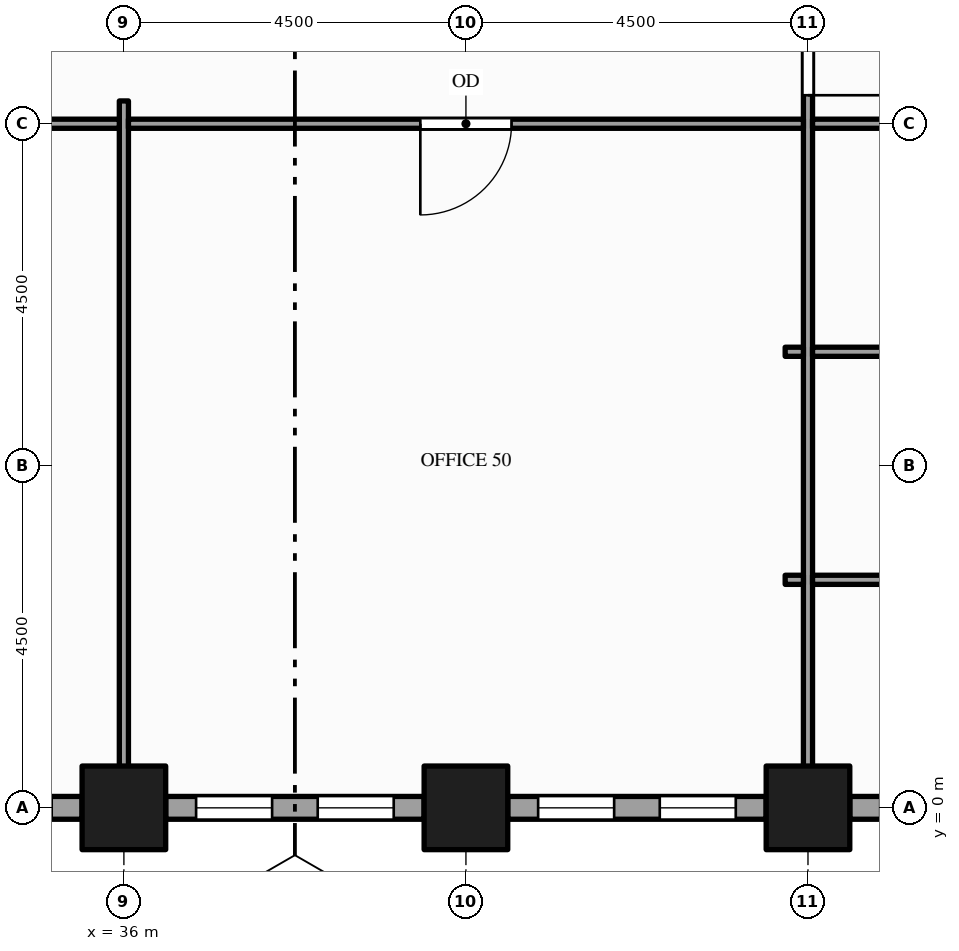
"""IFC4 building model, lengths in metres.
Left out: names, types, materials, properties, quantities, classifications, styles, units other than length and angle.
Written with IfcOpenShell. Run it as: python <this file> out.ifc"""

import sys

from ifc_helpers import new_model, si_unit, direction, frame, frame_2d, origin, origin_2d, place, context, subcontext, project, spatial, rectangle, hollow_rectangle, extrude, element, fill, save


model = new_model("IFC4")
c1 = context("Model", 3, precision=1e-05, world=origin(), true_north=direction((0.0, 1.0)))
c2 = subcontext(c1, "Body", "Model", "MODEL_VIEW")
j1 = project(units=[si_unit("LENGTHUNIT", "METRE"), si_unit("PLANEANGLEUNIT", "RADIAN")], contexts=[c1])
p1 = place(None, origin())
s1 = spatial("IfcSite", under=j1, at=p1, CompositionType="ELEMENT")
p2 = place(p1, origin())
s2 = spatial("IfcBuilding", under=s1, at=p2, CompositionType="ELEMENT")
p3 = place(p2, frame((0.0, 0.0, 19.0)))
s3 = spatial("IfcBuildingStorey", under=s2, at=p3, CompositionType="ELEMENT", Elevation=19.0)
for number, where, z_axis, x_axis in (
    (1, (36.0, 0.0, -0.25), (0.0, 0.0, 1.0), (1.0, 0.0, 0.0)),
    (2, (40.5, 0.0, -0.25), (0.0, 0.0, 1.0), (1.0, 0.0, 0.0)),
    (3, (45.0, 0.0, -0.25), (0.0, 0.0, 1.0), (1.0, 0.0, 0.0)),
):
    element("IfcColumn", number, at=place(p3, frame(where, z_axis=z_axis, x_axis=x_axis)), inside=s3, PredefinedType="COLUMN", context=c2, shape_type="SweptSolid", body=[
        extrude(hollow_rectangle(XDim=1.1, YDim=1.1, WallThickness=0.06, at=origin_2d()), origin(), (0.0, 0.0, 1.0), 5.0),
    ])
p4 = place(p3, frame((32.05, 0.0, 0.0), z_axis=(0.0, 0.0, 1.0), x_axis=(1.0, 0.0, 0.0)))
e4 = element("IfcWall", 4, at=p4, inside=s3, PredefinedType="STANDARD", context=c2, shape_type="SweptSolid", body=[
    extrude(rectangle(XDim=3.4, YDim=0.3, at=frame_2d((1.7, 0.0))), origin(), (0.0, 0.0, 1.0), 4.036),
])
p5 = place(p4, frame((0.4, 0.0, 0.9)))
e5 = element("IfcOpeningElement", 5, at=p5, cuts=e4, PredefinedType="OPENING", context=c2, shape_type="SweptSolid", body=[
    extrude(rectangle(XDim=1.0, YDim=2.75, at=frame_2d((0.5, 1.375))), frame((0.0, 0.16, 0.0), z_axis=(0.0, -1.0, 0.0), x_axis=(1.0, 0.0, 0.0)), (0.0, 0.0, 1.0), 0.32),
])
p6 = place(p4, frame((2.0, 0.0, 0.9)))
e6 = element("IfcOpeningElement", 6, at=p6, cuts=e4, PredefinedType="OPENING", context=c2, shape_type="SweptSolid", body=[
    extrude(rectangle(XDim=1.0, YDim=2.75, at=frame_2d((0.5, 1.375))), frame((0.0, 0.16, 0.0), z_axis=(0.0, -1.0, 0.0), x_axis=(1.0, 0.0, 0.0)), (0.0, 0.0, 1.0), 0.32),
])
p7 = place(p3, frame((36.55, 0.0, 0.0), z_axis=(0.0, 0.0, 1.0), x_axis=(1.0, 0.0, 0.0)))
e7 = element("IfcWall", 7, at=p7, inside=s3, PredefinedType="STANDARD", context=c2, shape_type="SweptSolid", body=[
    extrude(rectangle(XDim=3.4, YDim=0.3, at=frame_2d((1.7, 0.0))), origin(), (0.0, 0.0, 1.0), 4.036),
])
p8 = place(p7, frame((0.4, 0.0, 0.9)))
e8 = element("IfcOpeningElement", 8, at=p8, cuts=e7, PredefinedType="OPENING", context=c2, shape_type="SweptSolid", body=[
    extrude(rectangle(XDim=1.0, YDim=2.75, at=frame_2d((0.5, 1.375))), frame((0.0, 0.16, 0.0), z_axis=(0.0, -1.0, 0.0), x_axis=(1.0, 0.0, 0.0)), (0.0, 0.0, 1.0), 0.32),
])
p9 = place(p7, frame((2.0, 0.0, 0.9)))
e9 = element("IfcOpeningElement", 9, at=p9, cuts=e7, PredefinedType="OPENING", context=c2, shape_type="SweptSolid", body=[
    extrude(rectangle(XDim=1.0, YDim=2.75, at=frame_2d((0.5, 1.375))), frame((0.0, 0.16, 0.0), z_axis=(0.0, -1.0, 0.0), x_axis=(1.0, 0.0, 0.0)), (0.0, 0.0, 1.0), 0.32),
])
p10 = place(p3, frame((41.05, 0.0, 0.0), z_axis=(0.0, 0.0, 1.0), x_axis=(1.0, 0.0, 0.0)))
e10 = element("IfcWall", 10, at=p10, inside=s3, PredefinedType="STANDARD", context=c2, shape_type="SweptSolid", body=[
    extrude(rectangle(XDim=3.4, YDim=0.3, at=frame_2d((1.7, 0.0))), origin(), (0.0, 0.0, 1.0), 4.036),
])
p11 = place(p10, frame((0.4, 0.0, 0.9)))
e11 = element("IfcOpeningElement", 11, at=p11, cuts=e10, PredefinedType="OPENING", context=c2, shape_type="SweptSolid", body=[
    extrude(rectangle(XDim=1.0, YDim=2.75, at=frame_2d((0.5, 1.375))), frame((0.0, 0.16, 0.0), z_axis=(0.0, -1.0, 0.0), x_axis=(1.0, 0.0, 0.0)), (0.0, 0.0, 1.0), 0.32),
])
p12 = place(p10, frame((2.0, 0.0, 0.9)))
e12 = element("IfcOpeningElement", 12, at=p12, cuts=e10, PredefinedType="OPENING", context=c2, shape_type="SweptSolid", body=[
    extrude(rectangle(XDim=1.0, YDim=2.75, at=frame_2d((0.5, 1.375))), frame((0.0, 0.16, 0.0), z_axis=(0.0, -1.0, 0.0), x_axis=(1.0, 0.0, 0.0)), (0.0, 0.0, 1.0), 0.32),
])
p13 = place(p3, frame((45.55, 0.0, 0.0), z_axis=(0.0, 0.0, 1.0), x_axis=(1.0, 0.0, 0.0)))
e13 = element("IfcWall", 13, at=p13, inside=s3, PredefinedType="STANDARD", context=c2, shape_type="SweptSolid", body=[
    extrude(rectangle(XDim=3.4, YDim=0.3, at=frame_2d((1.7, 0.0))), origin(), (0.0, 0.0, 1.0), 4.036),
])
p14 = place(p13, frame((0.4, 0.0, 0.9)))
e14 = element("IfcOpeningElement", 14, at=p14, cuts=e13, PredefinedType="OPENING", context=c2, shape_type="SweptSolid", body=[
    extrude(rectangle(XDim=1.0, YDim=2.75, at=frame_2d((0.5, 1.375))), frame((0.0, 0.16, 0.0), z_axis=(0.0, -1.0, 0.0), x_axis=(1.0, 0.0, 0.0)), (0.0, 0.0, 1.0), 0.32),
])
p15 = place(p13, frame((2.0, 0.0, 0.9)))
e15 = element("IfcOpeningElement", 15, at=p15, cuts=e13, PredefinedType="OPENING", context=c2, shape_type="SweptSolid", body=[
    extrude(rectangle(XDim=1.0, YDim=2.75, at=frame_2d((0.5, 1.375))), frame((0.0, 0.16, 0.0), z_axis=(0.0, -1.0, 0.0), x_axis=(1.0, 0.0, 0.0)), (0.0, 0.0, 1.0), 0.32),
])
p16 = place(p3, frame((36.0, 0.15, 0.0), z_axis=(0.0, 0.0, 1.0), x_axis=(0.0, 1.0, 0.0)))
e16 = element("IfcWall", 16, at=p16, inside=s3, PredefinedType="PARTITIONING", context=c2, shape_type="SweptSolid", body=[
    extrude(rectangle(XDim=9.15, YDim=0.12, at=frame_2d((4.575, 0.0))), origin(), (0.0, 0.0, 1.0), 3.759),
])
p17 = place(p3, frame((45.0, 0.15, 0.0), z_axis=(0.0, 0.0, 1.0), x_axis=(0.0, 1.0, 0.0)))
e17 = element("IfcWall", 17, at=p17, inside=s3, PredefinedType="PARTITIONING", context=c2, shape_type="SweptSolid", body=[
    extrude(rectangle(XDim=22.65, YDim=0.12, at=frame_2d((11.325, 0.0))), origin(), (0.0, 0.0, 1.0), 3.759),
])
p18 = place(p17, frame((9.225, 0.0, 0.0)))
e18 = element("IfcOpeningElement", 18, at=p18, cuts=e17, PredefinedType="OPENING", context=c2, shape_type="SweptSolid", body=[
    extrude(rectangle(XDim=1.5, YDim=2.1, at=frame_2d((0.75, 1.05))), frame((0.0, 0.07, 0.0), z_axis=(0.0, -1.0, 0.0), x_axis=(1.0, 0.0, 0.0)), (0.0, 0.0, 1.0), 0.14),
])
p19 = place(p3, frame((44.7, 3.0, 0.0), z_axis=(0.0, 0.0, 1.0), x_axis=(1.0, 0.0, 0.0)))
e19 = element("IfcWall", 19, at=p19, inside=s3, PredefinedType="PARTITIONING", context=c2, shape_type="SweptSolid", body=[
    extrude(rectangle(XDim=0.24, YDim=0.12, at=frame_2d((0.12, 0.0))), origin(), (0.0, 0.0, 1.0), 3.759),
])
p20 = place(p3, frame((45.06, 3.0, 0.0), z_axis=(0.0, 0.0, 1.0), x_axis=(1.0, 0.0, 0.0)))
e20 = element("IfcWall", 20, at=p20, inside=s3, PredefinedType="PARTITIONING", context=c2, shape_type="SweptSolid", body=[
    extrude(rectangle(XDim=4.38, YDim=0.12, at=frame_2d((2.19, 0.0))), origin(), (0.0, 0.0, 1.0), 3.66),
])
p21 = place(p3, frame((44.7, 6.0, 0.0), z_axis=(0.0, 0.0, 1.0), x_axis=(1.0, 0.0, 0.0)))
e21 = element("IfcWall", 21, at=p21, inside=s3, PredefinedType="PARTITIONING", context=c2, shape_type="SweptSolid", body=[
    extrude(rectangle(XDim=0.24, YDim=0.12, at=frame_2d((0.12, 0.0))), origin(), (0.0, 0.0, 1.0), 3.759),
])
p22 = place(p3, frame((45.06, 6.0, 0.0), z_axis=(0.0, 0.0, 1.0), x_axis=(1.0, 0.0, 0.0)))
e22 = element("IfcWall", 22, at=p22, inside=s3, PredefinedType="PARTITIONING", context=c2, shape_type="SweptSolid", body=[
    extrude(rectangle(XDim=4.38, YDim=0.12, at=frame_2d((2.19, 0.0))), origin(), (0.0, 0.0, 1.0), 3.66),
])
p23 = place(p3, frame((22.56, 9.0, 0.0), z_axis=(0.0, 0.0, 1.0), x_axis=(1.0, 0.0, 0.0)))
e23 = element("IfcWall", 23, at=p23, inside=s3, PredefinedType="PARTITIONING", context=c2, shape_type="SweptSolid", body=[
    extrude(rectangle(XDim=13.38, YDim=0.12, at=frame_2d((6.69, 0.0))), origin(), (0.0, 0.0, 1.0), 3.66),
])
p24 = place(p23, frame((6.09, 0.0, 0.0)))
e24 = element("IfcOpeningElement", 24, at=p24, cuts=e23, PredefinedType="OPENING", context=c2, shape_type="SweptSolid", body=[
    extrude(rectangle(XDim=1.2, YDim=2.1, at=frame_2d((0.6, 1.05))), frame((0.0, 0.07, 0.0), z_axis=(0.0, -1.0, 0.0), x_axis=(1.0, 0.0, 0.0)), (0.0, 0.0, 1.0), 0.14),
])
p25 = place(p3, frame((36.06, 9.0, 0.0), z_axis=(0.0, 0.0, 1.0), x_axis=(1.0, 0.0, 0.0)))
e25 = element("IfcWall", 25, at=p25, inside=s3, PredefinedType="PARTITIONING", context=c2, shape_type="SweptSolid", body=[
    extrude(rectangle(XDim=8.88, YDim=0.12, at=frame_2d((4.44, 0.0))), origin(), (0.0, 0.0, 1.0), 3.66),
])
p26 = place(p25, frame((3.84, 0.0, 0.0)))
e26 = element("IfcOpeningElement", 26, at=p26, cuts=e25, PredefinedType="OPENING", context=c2, shape_type="SweptSolid", body=[
    extrude(rectangle(XDim=1.2, YDim=2.1, at=frame_2d((0.6, 1.05))), frame((0.0, 0.07, 0.0), z_axis=(0.0, -1.0, 0.0), x_axis=(1.0, 0.0, 0.0)), (0.0, 0.0, 1.0), 0.14),
])
p27 = place(p3, frame((45.06, 9.0, 0.0), z_axis=(0.0, 0.0, 1.0), x_axis=(1.0, 0.0, 0.0)))
e27 = element("IfcWall", 27, at=p27, inside=s3, PredefinedType="PARTITIONING", context=c2, shape_type="SweptSolid", body=[
    extrude(rectangle(XDim=4.38, YDim=0.12, at=frame_2d((2.19, 0.0))), origin(), (0.0, 0.0, 1.0), 3.66),
])
p28 = place(p8, origin())
e28 = element("IfcWindow", 28, at=p28, inside=s3, PartitioningType="SINGLE_PANEL", PredefinedType="WINDOW", context=c2, shape_type="SweptSolid", body=[
    extrude(rectangle(XDim=1.0, YDim=2.75, at=frame_2d((0.5, 1.375))), frame((0.0, 0.03, 0.0), z_axis=(0.0, -1.0, 0.0), x_axis=(1.0, 0.0, 0.0)), (0.0, 0.0, 1.0), 0.06),
])
fill(e8, e28)
p29 = place(p9, origin())
e29 = element("IfcWindow", 29, at=p29, inside=s3, PartitioningType="SINGLE_PANEL", PredefinedType="WINDOW", context=c2, shape_type="SweptSolid", body=[
    extrude(rectangle(XDim=1.0, YDim=2.75, at=frame_2d((0.5, 1.375))), frame((0.0, 0.03, 0.0), z_axis=(0.0, -1.0, 0.0), x_axis=(1.0, 0.0, 0.0)), (0.0, 0.0, 1.0), 0.06),
])
fill(e9, e29)
p30 = place(p11, origin())
e30 = element("IfcWindow", 30, at=p30, inside=s3, PartitioningType="SINGLE_PANEL", PredefinedType="WINDOW", context=c2, shape_type="SweptSolid", body=[
    extrude(rectangle(XDim=1.0, YDim=2.75, at=frame_2d((0.5, 1.375))), frame((0.0, 0.03, 0.0), z_axis=(0.0, -1.0, 0.0), x_axis=(1.0, 0.0, 0.0)), (0.0, 0.0, 1.0), 0.06),
])
fill(e11, e30)
p31 = place(p12, origin())
e31 = element("IfcWindow", 31, at=p31, inside=s3, PartitioningType="SINGLE_PANEL", PredefinedType="WINDOW", context=c2, shape_type="SweptSolid", body=[
    extrude(rectangle(XDim=1.0, YDim=2.75, at=frame_2d((0.5, 1.375))), frame((0.0, 0.03, 0.0), z_axis=(0.0, -1.0, 0.0), x_axis=(1.0, 0.0, 0.0)), (0.0, 0.0, 1.0), 0.06),
])
fill(e12, e31)
p32 = place(p18, origin())
e32 = element("IfcDoor", 32, at=p32, inside=s3, OperationType="SINGLE_SWING_LEFT", PredefinedType="DOOR", context=c2, shape_type="SweptSolid", body=[
    extrude(rectangle(XDim=1.5, YDim=2.1, at=frame_2d((0.75, 1.05))), frame((0.0, 0.025, 0.0), z_axis=(0.0, -1.0, 0.0), x_axis=(1.0, 0.0, 0.0)), (0.0, 0.0, 1.0), 0.05),
])
fill(e18, e32)
p33 = place(p26, origin())
e33 = element("IfcDoor", 33, at=p33, inside=s3, OperationType="SINGLE_SWING_LEFT", PredefinedType="DOOR", context=c2, shape_type="SweptSolid", body=[
    extrude(rectangle(XDim=1.2, YDim=2.1, at=frame_2d((0.6, 1.05))), frame((0.0, 0.025, 0.0), z_axis=(0.0, -1.0, 0.0), x_axis=(1.0, 0.0, 0.0)), (0.0, 0.0, 1.0), 0.05),
])
fill(e26, e33)
save(model, sys.argv[1])
